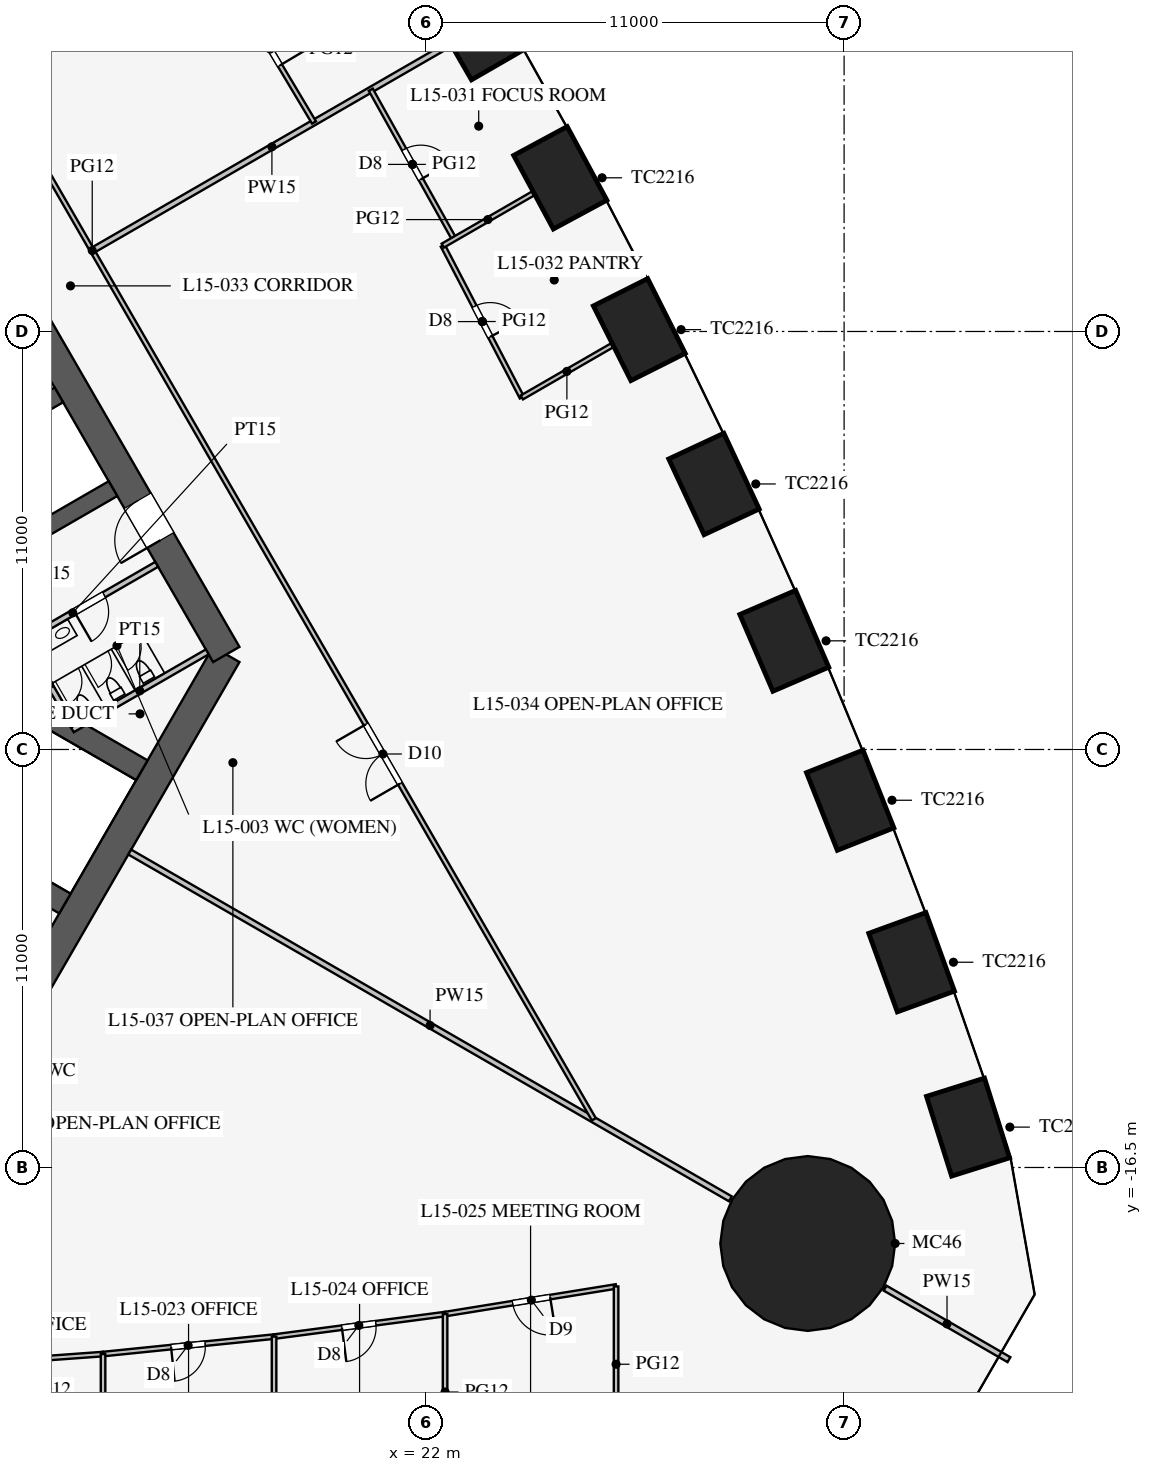
"""IFC4 building model, lengths in metres.
Left out: names, types, materials, properties, quantities, classifications, styles, units other than length and angle.
Written with IfcOpenShell. Run it as: python <this file> out.ifc"""

import sys

from ifc_helpers import new_model, si_unit, direction, frame, frame_2d, origin, origin_2d, place, context, subcontext, project, spatial, rectangle, circle, extrude, element, fill, save


model = new_model("IFC4")
c1 = context("Model", 3, precision=1e-05, world=origin(), true_north=direction((0.0, 1.0)))
c2 = subcontext(c1, "Body", "Model", "MODEL_VIEW")
j1 = project(units=[si_unit("LENGTHUNIT", "METRE"), si_unit("PLANEANGLEUNIT", "RADIAN")], contexts=[c1])
p1 = place(None, origin())
s1 = spatial("IfcSite", under=j1, at=p1, CompositionType="ELEMENT")
p2 = place(p1, origin())
s2 = spatial("IfcBuilding", under=s1, at=p2, CompositionType="ELEMENT")
p3 = place(p2, frame((0.0, 0.0, 66.9)))
s3 = spatial("IfcBuildingStorey", under=s2, at=p3, CompositionType="ELEMENT", Elevation=66.9)
for number, where, z_axis, x_axis in (
    (1, (36.262, -15.438, 0.0), (0.0, 0.0, 1.0), (-0.3, 0.954, 0.0)),
    (2, (34.776, -11.099, 0.0), (0.0, 0.0, 1.0), (-0.342, 0.94, 0.0)),
    (3, (33.16, -6.836, 0.0), (0.0, 0.0, 1.0), (-0.369, 0.929, 0.0)),
    (4, (31.426, -2.641, 0.0), (0.0, 0.0, 1.0), (-0.396, 0.918, 0.0)),
    (5, (29.576, 1.487, 0.0), (0.0, 0.0, 1.0), (-0.423, 0.906, 0.0)),
    (6, (27.611, 5.549, 0.0), (0.0, 0.0, 1.0), (-0.449, 0.894, 0.0)),
    (7, (25.531, 9.544, 0.0), (0.0, 0.0, 1.0), (-0.475, 0.88, 0.0)),
    (8, (23.338, 13.474, 0.0), (0.0, 0.0, 1.0), (-0.5, 0.866, 0.0)),
):
    element("IfcColumn", number, at=place(p3, frame(where, z_axis=z_axis, x_axis=x_axis)), inside=s3, PredefinedType="COLUMN", context=c2, shape_type="SweptSolid", body=[
        extrude(rectangle(XDim=2.2, YDim=1.6, at=origin_2d()), origin(), (0.0, 0.0, 1.0), 4.2),
    ])
p4 = place(p3, frame((32.043, -18.5, 0.0), z_axis=(0.0, 0.0, 1.0), x_axis=(1.0, 0.0, 0.0)))
e9 = element("IfcColumn", 9, at=p4, inside=s3, PredefinedType="COLUMN", context=c2, shape_type="SweptSolid", body=[
    extrude(circle(Radius=2.3, at=origin_2d()), origin(), (0.0, 0.0, 1.0), 4.2),
])
p5 = place(p3, frame((10.97, -13.0, 0.0), z_axis=(0.0, 0.0, 1.0), x_axis=(0.499995765644, 0.866027848477, 0.0)))
e10 = element("IfcWall", 10, at=p5, inside=s3, PredefinedType="SHEAR", context=c2, shape_type="SweptSolid", body=[
    extrude(rectangle(XDim=11.547, YDim=0.8, at=frame_2d((5.773, 0.0))), origin(), (0.0, 0.0, 1.0), 4.2),
])
p6 = place(p3, frame((16.743, -3.0, 0.0), z_axis=(0.0, 0.0, 1.0), x_axis=(-0.500002442456, 0.866023993627, 0.0)))
e11 = element("IfcWall", 11, at=p6, inside=s3, PredefinedType="SHEAR", context=c2, shape_type="SweptSolid", body=[
    extrude(rectangle(XDim=21.939, YDim=0.8, at=frame_2d((10.97, 0.0))), origin(), (0.0, 0.0, 1.0), 4.2),
])
p7 = place(p6, frame((17.27, 0.0, 0.0)))
e12 = element("IfcOpeningElement", 12, at=p7, cuts=e11, PredefinedType="OPENING", context=c2, shape_type="SweptSolid", body=[
    extrude(rectangle(XDim=1.2, YDim=2.1, at=frame_2d((0.6, 1.05))), frame((0.0, 0.41, 0.0), z_axis=(0.0, -1.0, 0.0), x_axis=(1.0, 0.0, 0.0)), (0.0, 0.0, 1.0), 0.82),
])
p8 = place(p6, frame((3.47, 0.0, 0.0)))
e13 = element("IfcOpeningElement", 13, at=p8, cuts=e11, PredefinedType="OPENING", context=c2, shape_type="SweptSolid", body=[
    extrude(rectangle(XDim=1.2, YDim=2.1, at=frame_2d((0.6, 1.05))), frame((0.0, 0.41, 0.0), z_axis=(0.0, -1.0, 0.0), x_axis=(1.0, 0.0, 0.0)), (0.0, 0.0, 1.0), 0.82),
])
for number, where, z_axis, x_axis in (
    (14, (11.532, 0.076, 0.0), (0.0, 0.0, 1.0), (0.866, 0.5, 0.0)),
    (15, (10.107, 2.544, 0.0), (0.0, 0.0, 1.0), (0.866, 0.5, 0.0)),
):
    element("IfcWall", number, at=place(p3, frame(where, z_axis=z_axis, x_axis=x_axis)), inside=s3, PredefinedType="SHEAR", context=c2, shape_type="SweptSolid", body=[
        extrude(rectangle(XDim=2.575, YDim=0.45, at=frame_2d((1.288, 0.0))), origin(), (0.0, 0.0, 1.0), 4.2),
    ])
for number, where, z_axis, x_axis in (
    (16, (4.638, -5.016, 0.0), (0.0, 0.0, 1.0), (0.866, -0.5, 0.0)),
    (17, (6.663, -1.509, 0.0), (0.0, 0.0, 1.0), (0.866, -0.5, 0.0)),
):
    element("IfcWall", number, at=place(p3, frame(where, z_axis=z_axis, x_axis=x_axis)), inside=s3, PredefinedType="SHEAR", context=c2, shape_type="SweptSolid", body=[
        extrude(rectangle(XDim=9.075, YDim=0.6, at=frame_2d((4.538, 0.0))), origin(), (0.0, 0.0, 1.0), 4.2),
    ])
p9 = place(p3, frame((10.495, -3.178, 0.0), z_axis=(0.0, 0.0, 1.0), x_axis=(0.86602216432, 0.500005610874, 0.0)))
e18 = element("IfcWall", 18, at=p9, inside=s3, PredefinedType="PARTITIONING", context=c2, shape_type="SweptSolid", body=[
    extrude(rectangle(XDim=5.1, YDim=0.15, at=frame_2d((2.55, 0.0))), origin(), (0.0, 0.0, 1.0), 4.0),
])
p10 = place(p9, frame((2.6, 0.0, 0.0)))
e19 = element("IfcOpeningElement", 19, at=p10, cuts=e18, PredefinedType="OPENING", context=c2, shape_type="SweptSolid", body=[
    extrude(rectangle(XDim=0.9, YDim=2.1, at=frame_2d((0.45, 1.05))), frame((0.0, 0.085, 0.0), z_axis=(0.0, -1.0, 0.0), x_axis=(1.0, 0.0, 0.0)), (0.0, 0.0, 1.0), 0.17),
])
p11 = place(p3, frame((12.691, -4.982, 0.0), z_axis=(0.0, 0.0, 1.0), x_axis=(0.8660249478, 0.500000789788, 0.0)))
e20 = element("IfcWall", 20, at=p11, inside=s3, PredefinedType="PARTITIONING", context=c2, shape_type="SweptSolid", body=[
    extrude(rectangle(XDim=4.1, YDim=0.15, at=frame_2d((2.05, 0.0))), origin(), (0.0, 0.0, 1.0), 4.0),
])
p12 = place(p3, frame((11.464, -2.706, 0.0), z_axis=(0.0, 0.0, 1.0), x_axis=(0.50001992892, -0.866013897511, 0.0)))
e21 = element("IfcWall", 21, at=p12, inside=s3, PredefinedType="PARTITIONING", context=c2, shape_type="SweptSolid", body=[
    extrude(rectangle(XDim=2.51, YDim=0.15, at=frame_2d((1.255, 0.0))), origin(), (0.0, 0.0, 1.0), 4.0),
])
p13 = place(p3, frame((14.203, -8.2, 0.0), z_axis=(0.0, 0.0, 1.0), x_axis=(0.866024965723, -0.500000758745, 0.0)))
e22 = element("IfcWall", 22, at=p13, inside=s3, PredefinedType="PARTITIONING", context=c2, shape_type="SweptSolid", body=[
    extrude(rectangle(XDim=18.25, YDim=0.15, at=frame_2d((9.125, 0.0))), origin(), (0.0, 0.0, 1.0), 2.3),
])
p14 = place(p3, frame((34.078, -19.675, 0.0), z_axis=(0.0, 0.0, 1.0), x_axis=(0.866019247219, -0.500010663332, 0.0)))
e23 = element("IfcWall", 23, at=p14, inside=s3, PredefinedType="PARTITIONING", context=c2, shape_type="SweptSolid", body=[
    extrude(rectangle(XDim=3.764, YDim=0.15, at=frame_2d((1.882, 0.0))), origin(), (0.0, 0.0, 1.0), 2.3),
])
p15 = place(p3, frame((13.5, -21.41, 0.0), z_axis=(0.0, 0.0, 1.0), x_axis=(0.994833141332, 0.101523499286, 0.0)))
e24 = element("IfcWall", 24, at=p15, inside=s3, PredefinedType="PARTITIONING", context=c2, shape_type="SweptSolid", body=[
    extrude(rectangle(XDim=4.523, YDim=0.12, at=frame_2d((2.262, 0.0))), origin(), (0.0, 0.0, 1.0), 2.9),
])
p16 = place(p15, frame((1.8, 0.0, 0.15)))
e25 = element("IfcOpeningElement", 25, at=p16, cuts=e24, PredefinedType="OPENING", context=c2, shape_type="SweptSolid", body=[
    extrude(rectangle(XDim=0.9, YDim=2.1, at=frame_2d((0.45, 1.05))), frame((0.0, 0.07, 0.0), z_axis=(0.0, -1.0, 0.0), x_axis=(1.0, 0.0, 0.0)), (0.0, 0.0, 1.0), 0.14),
])
p17 = place(p3, frame((18.0, -20.951, 0.0), z_axis=(0.0, 0.0, 1.0), x_axis=(0.991435244698, 0.130599217346, 0.0)))
e26 = element("IfcWall", 26, at=p17, inside=s3, PredefinedType="PARTITIONING", context=c2, shape_type="SweptSolid", body=[
    extrude(rectangle(XDim=4.539, YDim=0.12, at=frame_2d((2.27, 0.0))), origin(), (0.0, 0.0, 1.0), 2.9),
])
p18 = place(p17, frame((1.8, 0.0, 0.15)))
e27 = element("IfcOpeningElement", 27, at=p18, cuts=e26, PredefinedType="OPENING", context=c2, shape_type="SweptSolid", body=[
    extrude(rectangle(XDim=0.9, YDim=2.1, at=frame_2d((0.45, 1.05))), frame((0.0, 0.07, 0.0), z_axis=(0.0, -1.0, 0.0), x_axis=(1.0, 0.0, 0.0)), (0.0, 0.0, 1.0), 0.14),
])
p19 = place(p3, frame((22.5, -20.358, 0.0), z_axis=(0.0, 0.0, 1.0), x_axis=(0.987181300889, 0.159602879593, 0.0)))
e28 = element("IfcWall", 28, at=p19, inside=s3, PredefinedType="PARTITIONING", context=c2, shape_type="SweptSolid", body=[
    extrude(rectangle(XDim=4.558, YDim=0.12, at=frame_2d((2.279, 0.0))), origin(), (0.0, 0.0, 1.0), 2.9),
])
p20 = place(p19, frame((1.8, 0.0, 0.15)))
e29 = element("IfcOpeningElement", 29, at=p20, cuts=e28, PredefinedType="OPENING", context=c2, shape_type="SweptSolid", body=[
    extrude(rectangle(XDim=1.0, YDim=2.1, at=frame_2d((0.5, 1.05))), frame((0.0, 0.07, 0.0), z_axis=(0.0, -1.0, 0.0), x_axis=(1.0, 0.0, 0.0)), (0.0, 0.0, 1.0), 0.14),
])
p21 = place(p3, frame((9.0, -21.737, 0.0), z_axis=(0.0, 0.0, 1.0), x_axis=(0.997363894896, 0.072562119306, 0.0)))
e30 = element("IfcWall", 30, at=p21, inside=s3, PredefinedType="PARTITIONING", context=c2, shape_type="SweptSolid", body=[
    extrude(rectangle(XDim=4.512, YDim=0.12, at=frame_2d((2.256, 0.0))), origin(), (0.0, 0.0, 1.0), 2.9),
])
p22 = place(p21, frame((1.8, 0.0, 0.15)))
e31 = element("IfcOpeningElement", 31, at=p22, cuts=e30, PredefinedType="OPENING", context=c2, shape_type="SweptSolid", body=[
    extrude(rectangle(XDim=0.9, YDim=2.1, at=frame_2d((0.45, 1.05))), frame((0.0, 0.07, 0.0), z_axis=(0.0, -1.0, 0.0), x_axis=(1.0, 0.0, 0.0)), (0.0, 0.0, 1.0), 0.14),
])
p23 = place(p3, frame((13.5, -21.41, 0.0), z_axis=(0.0, 0.0, 1.0), x_axis=(0.0, -1.0, 0.0)))
e32 = element("IfcWall", 32, at=p23, inside=s3, PredefinedType="PARTITIONING", context=c2, shape_type="SweptSolid", body=[
    extrude(rectangle(XDim=4.114, YDim=0.12, at=frame_2d((2.057, 0.0))), origin(), (0.0, 0.0, 1.0), 2.6),
])
p24 = place(p3, frame((18.0, -20.951, 0.0), z_axis=(0.0, 0.0, 1.0), x_axis=(0.0, -1.0, 0.0)))
e33 = element("IfcWall", 33, at=p24, inside=s3, PredefinedType="PARTITIONING", context=c2, shape_type="SweptSolid", body=[
    extrude(rectangle(XDim=4.109, YDim=0.12, at=frame_2d((2.054, 0.0))), origin(), (0.0, 0.0, 1.0), 2.6),
])
p25 = place(p3, frame((22.5, -20.358, 0.0), z_axis=(0.0, 0.0, 1.0), x_axis=(0.0, -1.0, 0.0)))
e34 = element("IfcWall", 34, at=p25, inside=s3, PredefinedType="PARTITIONING", context=c2, shape_type="SweptSolid", body=[
    extrude(rectangle(XDim=4.103, YDim=0.12, at=frame_2d((2.051, 0.0))), origin(), (0.0, 0.0, 1.0), 2.8),
])
p26 = place(p3, frame((27.0, -19.63, 0.0), z_axis=(0.0, 0.0, 1.0), x_axis=(0.0, -1.0, 0.0)))
e35 = element("IfcWall", 35, at=p26, inside=s3, PredefinedType="PARTITIONING", context=c2, shape_type="SweptSolid", body=[
    extrude(rectangle(XDim=4.095, YDim=0.12, at=frame_2d((2.047, 0.0))), origin(), (0.0, 0.0, 1.0), 2.9),
])
p27 = place(p3, frame((13.268, 7.66, 0.0), z_axis=(0.0, 0.0, 1.0), x_axis=(0.866019550038, 0.50001013885, 0.0)))
e36 = element("IfcWall", 36, at=p27, inside=s3, PredefinedType="PARTITIONING", context=c2, shape_type="SweptSolid", body=[
    extrude(rectangle(XDim=10.799, YDim=0.15, at=frame_2d((5.399, 0.0))), origin(), (0.0, 0.0, 1.0), 2.8),
])
p28 = place(p3, frame((26.415, -15.231, 0.0), z_axis=(0.0, 0.0, 1.0), x_axis=(-0.50000091641, 0.866024874695, 0.0)))
e37 = element("IfcWall", 37, at=p28, inside=s3, PredefinedType="PARTITIONING", context=c2, shape_type="SweptSolid", body=[
    extrude(rectangle(XDim=52.796, YDim=0.12, at=frame_2d((26.398, 0.0))), origin(), (0.0, 0.0, 1.0), 2.9),
])
p29 = place(p28, frame((10.2, 0.0, 0.15)))
e38 = element("IfcOpeningElement", 38, at=p29, cuts=e37, PredefinedType="OPENING", context=c2, shape_type="SweptSolid", body=[
    extrude(rectangle(XDim=1.8, YDim=2.1, at=frame_2d((0.9, 1.05))), frame((0.0, 0.07, 0.0), z_axis=(0.0, -1.0, 0.0), x_axis=(1.0, 0.0, 0.0)), (0.0, 0.0, 1.0), 0.14),
])
p30 = place(p28, frame((40.8, 0.0, 0.15)))
e39 = element("IfcOpeningElement", 39, at=p30, cuts=e37, PredefinedType="OPENING", context=c2, shape_type="SweptSolid", body=[
    extrude(rectangle(XDim=1.8, YDim=2.1, at=frame_2d((0.9, 1.05))), frame((0.0, 0.07, 0.0), z_axis=(0.0, -1.0, 0.0), x_axis=(1.0, 0.0, 0.0)), (0.0, 0.0, 1.0), 0.14),
])
p31 = place(p3, frame((19.052, 10.999, 0.0), z_axis=(0.0, 0.0, 1.0), x_axis=(-0.51252396108, 0.858672923364, 0.0)))
e40 = element("IfcWall", 40, at=p31, inside=s3, PredefinedType="PARTITIONING", context=c2, shape_type="SweptSolid", body=[
    extrude(rectangle(XDim=4.5, YDim=0.12, at=frame_2d((2.25, 0.0))), origin(), (0.0, 0.0, 1.0), 2.9),
])
p32 = place(p31, frame((1.75, 0.0, 0.15)))
e41 = element("IfcOpeningElement", 41, at=p32, cuts=e40, PredefinedType="OPENING", context=c2, shape_type="SweptSolid", body=[
    extrude(rectangle(XDim=1.0, YDim=2.1, at=frame_2d((0.5, 1.05))), frame((0.0, 0.07, 0.0), z_axis=(0.0, -1.0, 0.0), x_axis=(1.0, 0.0, 0.0)), (0.0, 0.0, 1.0), 0.14),
])
p33 = place(p3, frame((22.739, 7.932, 0.0), z_axis=(0.0, 0.0, 1.0), x_axis=(-0.487373854787, 0.873193406795, 0.0)))
e42 = element("IfcWall", 42, at=p33, inside=s3, PredefinedType="PARTITIONING", context=c2, shape_type="SweptSolid", body=[
    extrude(rectangle(XDim=4.5, YDim=0.12, at=frame_2d((2.25, 0.0))), origin(), (0.0, 0.0, 1.0), 2.9),
])
p34 = place(p33, frame((1.8, 0.0, 0.15)))
e43 = element("IfcOpeningElement", 43, at=p34, cuts=e42, PredefinedType="OPENING", context=c2, shape_type="SweptSolid", body=[
    extrude(rectangle(XDim=0.9, YDim=2.1, at=frame_2d((0.45, 1.05))), frame((0.0, 0.07, 0.0), z_axis=(0.0, -1.0, 0.0), x_axis=(1.0, 0.0, 0.0)), (0.0, 0.0, 1.0), 0.14),
])
p35 = place(p3, frame((24.52, 3.764, 0.0), z_axis=(0.0, 0.0, 1.0), x_axis=(-0.461852697957, 0.886956642339, 0.0)))
e44 = element("IfcWall", 44, at=p35, inside=s3, PredefinedType="PARTITIONING", context=c2, shape_type="SweptSolid", body=[
    extrude(rectangle(XDim=4.504, YDim=0.12, at=frame_2d((2.252, 0.0))), origin(), (0.0, 0.0, 1.0), 2.9),
])
p36 = place(p35, frame((1.8, 0.0, 0.15)))
e45 = element("IfcOpeningElement", 45, at=p36, cuts=e44, PredefinedType="OPENING", context=c2, shape_type="SweptSolid", body=[
    extrude(rectangle(XDim=0.9, YDim=2.1, at=frame_2d((0.45, 1.05))), frame((0.0, 0.07, 0.0), z_axis=(0.0, -1.0, 0.0), x_axis=(1.0, 0.0, 0.0)), (0.0, 0.0, 1.0), 0.14),
])
p37 = place(p3, frame((22.44, 7.76, 0.0), z_axis=(0.0, 0.0, 1.0), x_axis=(0.866029747927, 0.499992475648, 0.0)))
e46 = element("IfcWall", 46, at=p37, inside=s3, PredefinedType="PARTITIONING", context=c2, shape_type="SweptSolid", body=[
    extrude(rectangle(XDim=2.739, YDim=0.12, at=frame_2d((1.37, 0.0))), origin(), (0.0, 0.0, 1.0), 2.8),
])
p38 = place(p3, frame((24.52, 3.764, 0.0), z_axis=(0.0, 0.0, 1.0), x_axis=(0.866028150195, 0.499995243048, 0.0)))
e47 = element("IfcWall", 47, at=p38, inside=s3, PredefinedType="PARTITIONING", context=c2, shape_type="SweptSolid", body=[
    extrude(rectangle(XDim=2.737, YDim=0.12, at=frame_2d((1.369, 0.0))), origin(), (0.0, 0.0, 1.0), 2.8),
])
p39 = place(p10, frame((0.9, 0.0, 0.0), z_axis=(0.0, 0.0, 1.0), x_axis=(-1.0, 0.0, 0.0)))
e48 = element("IfcDoor", 48, at=p39, inside=s3, OperationType="SINGLE_SWING_RIGHT", PredefinedType="DOOR", context=c2, shape_type="SweptSolid", body=[
    extrude(rectangle(XDim=0.9, YDim=2.1, at=frame_2d((0.45, 1.05))), frame((0.0, 0.025, 0.0), z_axis=(0.0, -1.0, 0.0), x_axis=(1.0, 0.0, 0.0)), (0.0, 0.0, 1.0), 0.05),
])
fill(e19, e48)
p40 = place(p8, origin())
e49 = element("IfcDoor", 49, at=p40, inside=s3, OperationType="SINGLE_SWING_LEFT", PredefinedType="DOOR", context=c2, shape_type="SweptSolid", body=[
    extrude(rectangle(XDim=1.2, YDim=2.1, at=frame_2d((0.6, 1.05))), frame((0.0, 0.025, 0.0), z_axis=(0.0, -1.0, 0.0), x_axis=(1.0, 0.0, 0.0)), (0.0, 0.0, 1.0), 0.05),
])
fill(e13, e49)
p41 = place(p16, frame((0.9, 0.0, 0.0), z_axis=(0.0, 0.0, 1.0), x_axis=(-1.0, 0.0, 0.0)))
e50 = element("IfcDoor", 50, at=p41, inside=s3, OperationType="SINGLE_SWING_RIGHT", PredefinedType="DOOR", context=c2, shape_type="SweptSolid", body=[
    extrude(rectangle(XDim=0.9, YDim=2.1, at=frame_2d((0.45, 1.05))), frame((0.0, 0.025, 0.0), z_axis=(0.0, -1.0, 0.0), x_axis=(1.0, 0.0, 0.0)), (0.0, 0.0, 1.0), 0.05),
])
fill(e25, e50)
p42 = place(p18, frame((0.9, 0.0, 0.0), z_axis=(0.0, 0.0, 1.0), x_axis=(-1.0, 0.0, 0.0)))
e51 = element("IfcDoor", 51, at=p42, inside=s3, OperationType="SINGLE_SWING_RIGHT", PredefinedType="DOOR", context=c2, shape_type="SweptSolid", body=[
    extrude(rectangle(XDim=0.9, YDim=2.1, at=frame_2d((0.45, 1.05))), frame((0.0, 0.025, 0.0), z_axis=(0.0, -1.0, 0.0), x_axis=(1.0, 0.0, 0.0)), (0.0, 0.0, 1.0), 0.05),
])
fill(e27, e51)
p43 = place(p20, frame((1.0, 0.0, 0.0), z_axis=(0.0, 0.0, 1.0), x_axis=(-1.0, 0.0, 0.0)))
e52 = element("IfcDoor", 52, at=p43, inside=s3, OperationType="SINGLE_SWING_LEFT", PredefinedType="DOOR", context=c2, shape_type="SweptSolid", body=[
    extrude(rectangle(XDim=1.0, YDim=2.1, at=frame_2d((0.5, 1.05))), frame((0.0, 0.025, 0.0), z_axis=(0.0, -1.0, 0.0), x_axis=(1.0, 0.0, 0.0)), (0.0, 0.0, 1.0), 0.05),
])
fill(e29, e52)
p44 = place(p32, frame((1.0, 0.0, 0.0), z_axis=(0.0, 0.0, 1.0), x_axis=(-1.0, 0.0, 0.0)))
e53 = element("IfcDoor", 53, at=p44, inside=s3, OperationType="SINGLE_SWING_RIGHT", PredefinedType="DOOR", context=c2, shape_type="SweptSolid", body=[
    extrude(rectangle(XDim=1.0, YDim=2.1, at=frame_2d((0.5, 1.05))), frame((0.0, 0.025, 0.0), z_axis=(0.0, -1.0, 0.0), x_axis=(1.0, 0.0, 0.0)), (0.0, 0.0, 1.0), 0.05),
])
fill(e41, e53)
p45 = place(p34, frame((0.9, 0.0, 0.0), z_axis=(0.0, 0.0, 1.0), x_axis=(-1.0, 0.0, 0.0)))
e54 = element("IfcDoor", 54, at=p45, inside=s3, OperationType="SINGLE_SWING_RIGHT", PredefinedType="DOOR", context=c2, shape_type="SweptSolid", body=[
    extrude(rectangle(XDim=0.9, YDim=2.1, at=frame_2d((0.45, 1.05))), frame((0.0, 0.025, 0.0), z_axis=(0.0, -1.0, 0.0), x_axis=(1.0, 0.0, 0.0)), (0.0, 0.0, 1.0), 0.05),
])
fill(e43, e54)
p46 = place(p36, frame((0.9, 0.0, 0.0), z_axis=(0.0, 0.0, 1.0), x_axis=(-1.0, 0.0, 0.0)))
e55 = element("IfcDoor", 55, at=p46, inside=s3, OperationType="SINGLE_SWING_RIGHT", PredefinedType="DOOR", context=c2, shape_type="SweptSolid", body=[
    extrude(rectangle(XDim=0.9, YDim=2.1, at=frame_2d((0.45, 1.05))), frame((0.0, 0.025, 0.0), z_axis=(0.0, -1.0, 0.0), x_axis=(1.0, 0.0, 0.0)), (0.0, 0.0, 1.0), 0.05),
])
fill(e45, e55)
p47 = place(p29, origin())
e56 = element("IfcDoor", 56, at=p47, inside=s3, OperationType="DOUBLE_DOOR_SINGLE_SWING", PredefinedType="DOOR", context=c2, shape_type="SweptSolid", body=[
    extrude(rectangle(XDim=1.8, YDim=2.1, at=frame_2d((0.9, 1.05))), frame((0.0, 0.025, 0.0), z_axis=(0.0, -1.0, 0.0), x_axis=(1.0, 0.0, 0.0)), (0.0, 0.0, 1.0), 0.05),
])
fill(e38, e56)
save(model, sys.argv[1])
